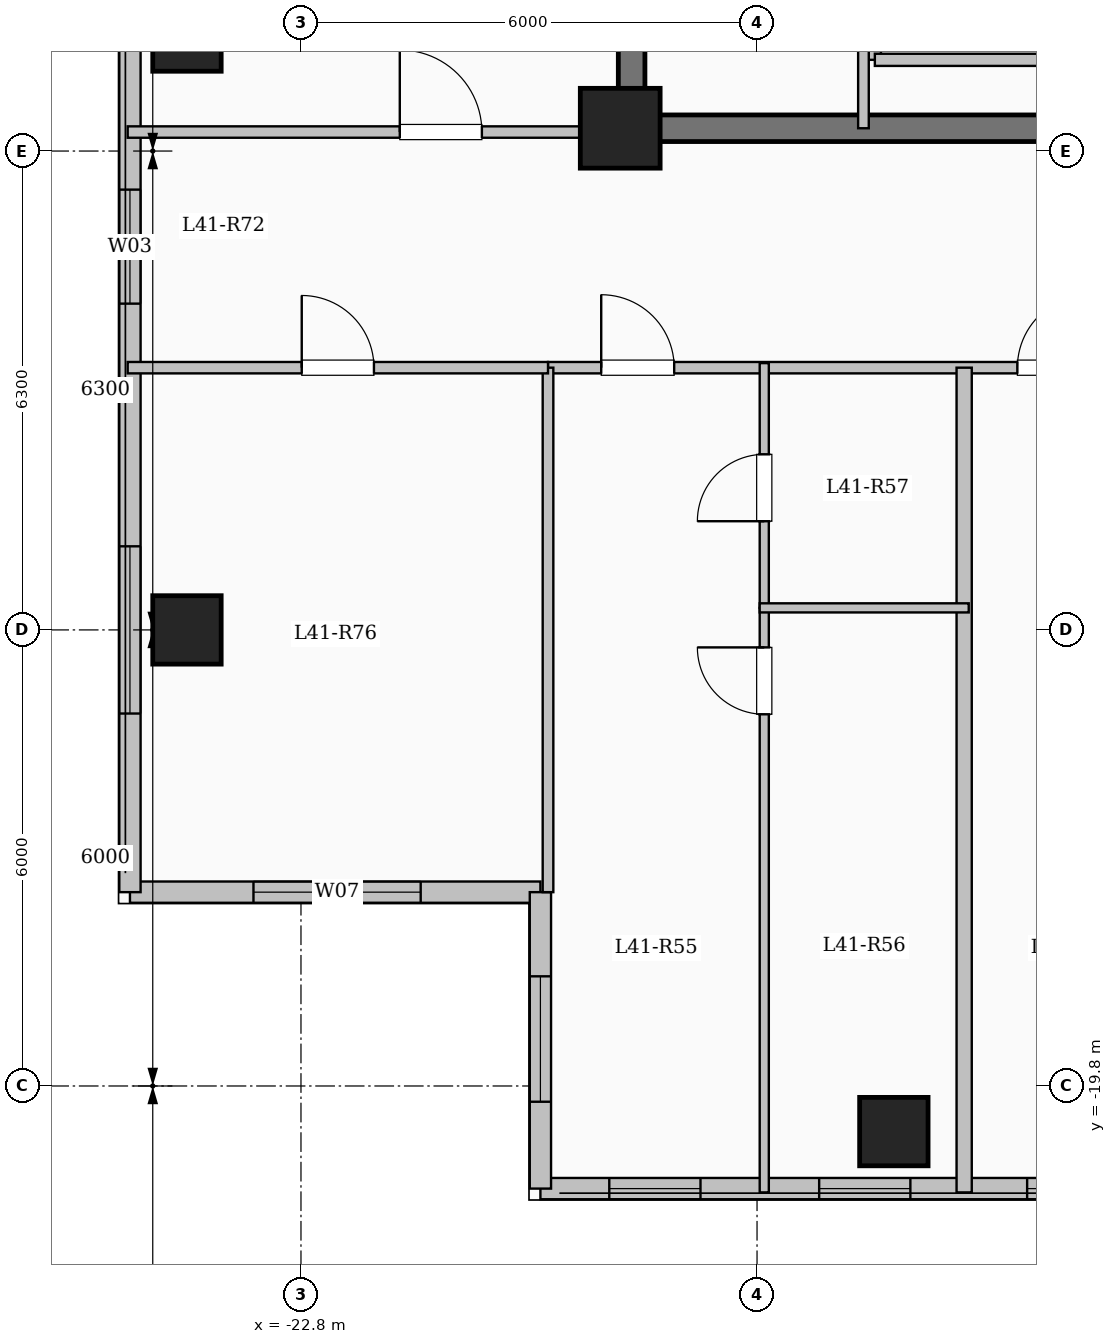
"""IFC4 building model, lengths in metres.
Left out: names, types, materials, properties, quantities, classifications, styles, units other than length and angle.
Written with IfcOpenShell. Run it as: python <this file> out.ifc"""

import sys

from ifc_helpers import new_model, si_unit, direction, frame, frame_2d, origin, origin_2d, place, context, subcontext, project, spatial, rectangle, extrude, element, fill, save


model = new_model("IFC4")
c1 = context("Model", 3, precision=1e-05, world=origin(), true_north=direction((0.0, 1.0)))
c2 = subcontext(c1, "Body", "Model", "MODEL_VIEW")
j1 = project(units=[si_unit("LENGTHUNIT", "METRE"), si_unit("PLANEANGLEUNIT", "RADIAN")], contexts=[c1])
p1 = place(None, origin())
s1 = spatial("IfcSite", under=j1, at=p1, CompositionType="ELEMENT")
p2 = place(p1, origin())
s2 = spatial("IfcBuilding", under=s1, at=p2, CompositionType="ELEMENT")
p3 = place(p2, frame((0.0, 0.0, 152.7)))
s3 = spatial("IfcBuildingStorey", under=s2, at=p3, CompositionType="ELEMENT", Elevation=152.7)
p4 = place(p3, frame((-18.6, -7.2, 0.0), z_axis=(0.0, 0.0, 1.0), x_axis=(1.0, 0.0, 0.0)))
e1 = element("IfcColumn", 1, at=p4, inside=s3, PredefinedType="COLUMN", context=c2, shape_type="SweptSolid", body=[
    extrude(rectangle(XDim=1.05, YDim=1.05, at=origin_2d()), origin(), (0.0, 0.0, 1.0), 3.35),
])
for number, where, z_axis, x_axis in (
    (2, (-15.0, -20.4, 0.0), (0.0, 0.0, 1.0), (1.0, 0.0, 0.0)),
    (3, (-24.3, -13.8, 0.0), (0.0, 0.0, 1.0), (1.0, 0.0, 0.0)),
    (4, (-24.3, -6.0, 0.0), (0.0, 0.0, 1.0), (1.0, 0.0, 0.0)),
):
    element("IfcColumn", number, at=place(p3, frame(where, z_axis=z_axis, x_axis=x_axis)), inside=s3, PredefinedType="COLUMN", context=c2, shape_type="SweptSolid", body=[
        extrude(rectangle(XDim=0.9, YDim=0.9, at=origin_2d()), origin(), (0.0, 0.0, 1.0), 3.35),
    ])
p5 = place(p3, frame((-19.65, -17.25, 0.0), z_axis=(0.0, 0.0, 1.0), x_axis=(-1.0, 0.0, 0.0)))
e5 = element("IfcWall", 5, at=p5, inside=s3, PredefinedType="SOLIDWALL", context=c2, shape_type="SweptSolid", body=[
    extrude(rectangle(XDim=5.4, YDim=0.28, at=frame_2d((2.7, 0.0))), origin(), (0.0, 0.0, 1.0), 3.1),
])
p6 = place(p5, frame((1.575, 0.0, 0.9)))
e6 = element("IfcOpeningElement", 6, at=p6, cuts=e5, PredefinedType="OPENING", context=c2, shape_type="SweptSolid", body=[
    extrude(rectangle(XDim=2.2, YDim=1.75, at=frame_2d((1.1, 0.875))), frame((0.0, 0.15, 0.0), z_axis=(0.0, -1.0, 0.0), x_axis=(1.0, 0.0, 0.0)), (0.0, 0.0, 1.0), 0.3),
])
p7 = place(p3, frame((-25.05, -17.25, 0.0), z_axis=(0.0, 0.0, 1.0), x_axis=(0.0, 1.0, 0.0)))
e7 = element("IfcWall", 7, at=p7, inside=s3, PredefinedType="SOLIDWALL", context=c2, shape_type="SweptSolid", body=[
    extrude(rectangle(XDim=34.5, YDim=0.28, at=frame_2d((17.25, 0.0))), origin(), (0.0, 0.0, 1.0), 3.1),
])
p8 = place(p7, frame((2.35, 0.0, 0.9)))
e8 = element("IfcOpeningElement", 8, at=p8, cuts=e7, PredefinedType="OPENING", context=c2, shape_type="SweptSolid", body=[
    extrude(rectangle(XDim=2.2, YDim=1.75, at=frame_2d((1.1, 0.875))), frame((0.0, 0.15, 0.0), z_axis=(0.0, -1.0, 0.0), x_axis=(1.0, 0.0, 0.0)), (0.0, 0.0, 1.0), 0.3),
])
p9 = place(p7, frame((7.742, 0.0, 0.9)))
e9 = element("IfcOpeningElement", 9, at=p9, cuts=e7, PredefinedType="OPENING", context=c2, shape_type="SweptSolid", body=[
    extrude(rectangle(XDim=1.5, YDim=1.65, at=frame_2d((0.75, 0.825))), frame((0.0, 0.15, 0.0), z_axis=(0.0, -1.0, 0.0), x_axis=(1.0, 0.0, 0.0)), (0.0, 0.0, 1.0), 0.3),
])
p10 = place(p7, frame((18.0, 0.0, 0.9)))
e10 = element("IfcOpeningElement", 10, at=p10, cuts=e7, PredefinedType="OPENING", context=c2, shape_type="SweptSolid", body=[
    extrude(rectangle(XDim=2.0, YDim=1.7, at=frame_2d((1.0, 0.85))), frame((0.0, 0.15, 0.0), z_axis=(0.0, -1.0, 0.0), x_axis=(1.0, 0.0, 0.0)), (0.0, 0.0, 1.0), 0.3),
])
p11 = place(p7, frame((28.375, 0.0, 0.95)))
e11 = element("IfcOpeningElement", 11, at=p11, cuts=e7, PredefinedType="OPENING", context=c2, shape_type="SweptSolid", body=[
    extrude(rectangle(XDim=1.0, YDim=1.5, at=frame_2d((0.5, 0.75))), frame((0.0, 0.15, 0.0), z_axis=(0.0, -1.0, 0.0), x_axis=(1.0, 0.0, 0.0)), (0.0, 0.0, 1.0), 0.3),
])
p12 = place(p7, frame((31.125, 0.0, 0.9)))
e12 = element("IfcOpeningElement", 12, at=p12, cuts=e7, PredefinedType="OPENING", context=c2, shape_type="SweptSolid", body=[
    extrude(rectangle(XDim=2.0, YDim=1.7, at=frame_2d((1.0, 0.85))), frame((0.0, 0.15, 0.0), z_axis=(0.0, -1.0, 0.0), x_axis=(1.0, 0.0, 0.0)), (0.0, 0.0, 1.0), 0.3),
])
p13 = place(p3, frame((-7.35, -21.15, 0.0), z_axis=(0.0, 0.0, 1.0), x_axis=(-1.0, 0.0, 0.0)))
e13 = element("IfcWall", 13, at=p13, inside=s3, PredefinedType="SOLIDWALL", context=c2, shape_type="SweptSolid", body=[
    extrude(rectangle(XDim=12.3, YDim=0.28, at=frame_2d((6.15, 0.0))), origin(), (0.0, 0.0, 1.0), 3.1),
])
p14 = place(p13, frame((0.147, 0.0, 0.95)))
e14 = element("IfcOpeningElement", 14, at=p14, cuts=e13, PredefinedType="OPENING", context=c2, shape_type="SweptSolid", body=[
    extrude(rectangle(XDim=0.85, YDim=1.5, at=frame_2d((0.425, 0.75))), frame((0.0, 0.15, 0.0), z_axis=(0.0, -1.0, 0.0), x_axis=(1.0, 0.0, 0.0)), (0.0, 0.0, 1.0), 0.3),
])
p15 = place(p13, frame((1.96, 0.0, 0.95)))
e15 = element("IfcOpeningElement", 15, at=p15, cuts=e13, PredefinedType="OPENING", context=c2, shape_type="SweptSolid", body=[
    extrude(rectangle(XDim=1.2, YDim=1.5, at=frame_2d((0.6, 0.75))), frame((0.0, 0.15, 0.0), z_axis=(0.0, -1.0, 0.0), x_axis=(1.0, 0.0, 0.0)), (0.0, 0.0, 1.0), 0.3),
])
p16 = place(p13, frame((4.697, 0.0, 0.95)))
e16 = element("IfcOpeningElement", 16, at=p16, cuts=e13, PredefinedType="OPENING", context=c2, shape_type="SweptSolid", body=[
    extrude(rectangle(XDim=1.2, YDim=1.5, at=frame_2d((0.6, 0.75))), frame((0.0, 0.15, 0.0), z_axis=(0.0, -1.0, 0.0), x_axis=(1.0, 0.0, 0.0)), (0.0, 0.0, 1.0), 0.3),
])
p17 = place(p13, frame((7.433, 0.0, 0.95)))
e17 = element("IfcOpeningElement", 17, at=p17, cuts=e13, PredefinedType="OPENING", context=c2, shape_type="SweptSolid", body=[
    extrude(rectangle(XDim=1.2, YDim=1.5, at=frame_2d((0.6, 0.75))), frame((0.0, 0.15, 0.0), z_axis=(0.0, -1.0, 0.0), x_axis=(1.0, 0.0, 0.0)), (0.0, 0.0, 1.0), 0.3),
])
p18 = place(p13, frame((10.194, 0.0, 0.95)))
e18 = element("IfcOpeningElement", 18, at=p18, cuts=e13, PredefinedType="OPENING", context=c2, shape_type="SweptSolid", body=[
    extrude(rectangle(XDim=1.2, YDim=1.5, at=frame_2d((0.6, 0.75))), frame((0.0, 0.15, 0.0), z_axis=(0.0, -1.0, 0.0), x_axis=(1.0, 0.0, 0.0)), (0.0, 0.0, 1.0), 0.3),
])
p19 = place(p3, frame((-19.65, -21.15, 0.0), z_axis=(0.0, 0.0, 1.0), x_axis=(0.0, 1.0, 0.0)))
e19 = element("IfcWall", 19, at=p19, inside=s3, PredefinedType="SOLIDWALL", context=c2, shape_type="SweptSolid", body=[
    extrude(rectangle(XDim=3.9, YDim=0.28, at=frame_2d((1.95, 0.0))), origin(), (0.0, 0.0, 1.0), 3.1),
])
p20 = place(p19, frame((1.143, 0.0, 0.9)))
e20 = element("IfcOpeningElement", 20, at=p20, cuts=e19, PredefinedType="OPENING", context=c2, shape_type="SweptSolid", body=[
    extrude(rectangle(XDim=1.65, YDim=1.6, at=frame_2d((0.825, 0.8))), frame((0.0, 0.15, 0.0), z_axis=(0.0, -1.0, 0.0), x_axis=(1.0, 0.0, 0.0)), (0.0, 0.0, 1.0), 0.3),
])
p21 = place(p3, frame((-15.25, -6.3, 0.0), z_axis=(0.0, 0.0, 1.0), x_axis=(0.0, 1.0, 0.0)))
e21 = element("IfcWall", 21, at=p21, inside=s3, PredefinedType="SOLIDWALL", context=c2, shape_type="SweptSolid", body=[
    extrude(rectangle(XDim=2.6, YDim=0.16, at=frame_2d((1.3, 0.0))), origin(), (0.0, 0.0, 1.0), 3.1),
])
p22 = place(p3, frame((-15.25, -6.3, 0.0), z_axis=(0.0, 0.0, 1.0), x_axis=(1.0, 0.0, 0.0)))
e22 = element("IfcWall", 22, at=p22, inside=s3, PredefinedType="SOLIDWALL", context=c2, shape_type="SweptSolid", body=[
    extrude(rectangle(XDim=2.3, YDim=0.16, at=frame_2d((1.15, 0.0))), origin(), (0.0, 0.0, 1.0), 3.1),
])
p23 = place(p3, frame((-18.45, -7.375, 0.0), z_axis=(0.0, 0.0, 1.0), x_axis=(0.0, 1.0, 0.0)))
e23 = element("IfcWall", 23, at=p23, inside=s3, PredefinedType="SHEAR", context=c2, shape_type="SweptSolid", body=[
    extrude(rectangle(XDim=14.05, YDim=0.35, at=frame_2d((7.025, 0.0))), origin(), (0.0, 0.0, 1.0), 3.35),
])
p24 = place(p3, frame((-18.625, -7.2, 0.0), z_axis=(0.0, 0.0, 1.0), x_axis=(1.0, 0.0, 0.0)))
e24 = element("IfcWall", 24, at=p24, inside=s3, PredefinedType="SHEAR", context=c2, shape_type="SweptSolid", body=[
    extrude(rectangle(XDim=8.55, YDim=0.35, at=frame_2d((4.275, 0.0))), origin(), (0.0, 0.0, 1.0), 3.35),
])
p25 = place(p3, frame((-15.4, -7.2, 0.0), z_axis=(0.0, 0.0, 1.0), x_axis=(0.0, 1.0, 0.0)))
e25 = element("IfcWall", 25, at=p25, inside=s3, PredefinedType="PARTITIONING", context=c2, shape_type="SweptSolid", body=[
    extrude(rectangle(XDim=10.45, YDim=0.14, at=frame_2d((5.225, 0.0))), origin(), (0.0, 0.0, 1.0), 3.1),
])
p26 = place(p25, frame((9.25, 0.0, 0.0)))
e26 = element("IfcOpeningElement", 26, at=p26, cuts=e25, PredefinedType="OPENING", context=c2, shape_type="SweptSolid", body=[
    extrude(rectangle(XDim=0.9, YDim=2.08, at=frame_2d((0.45, 1.04))), frame((0.0, 0.08, 0.0), z_axis=(0.0, -1.0, 0.0), x_axis=(1.0, 0.0, 0.0)), (0.0, 0.0, 1.0), 0.16),
])
p27 = place(p3, frame((-19.55, -10.35, 0.0), z_axis=(0.0, 0.0, 1.0), x_axis=(1.0, 0.0, 0.0)))
e27 = element("IfcWall", 27, at=p27, inside=s3, PredefinedType="PARTITIONING", context=c2, shape_type="SweptSolid", body=[
    extrude(rectangle(XDim=11.0, YDim=0.15, at=frame_2d((5.5, 0.0))), origin(), (0.0, 0.0, 1.0), 3.1),
])
p28 = place(p27, frame((0.7, 0.0, 0.0)))
e28 = element("IfcOpeningElement", 28, at=p28, cuts=e27, PredefinedType="OPENING", context=c2, shape_type="SweptSolid", body=[
    extrude(rectangle(XDim=0.96, YDim=2.15, at=frame_2d((0.48, 1.075))), frame((0.0, 0.085, 0.0), z_axis=(0.0, -1.0, 0.0), x_axis=(1.0, 0.0, 0.0)), (0.0, 0.0, 1.0), 0.17),
])
p29 = place(p27, frame((6.175, 0.0, 0.0)))
e29 = element("IfcOpeningElement", 29, at=p29, cuts=e27, PredefinedType="OPENING", context=c2, shape_type="SweptSolid", body=[
    extrude(rectangle(XDim=0.96, YDim=2.15, at=frame_2d((0.48, 1.075))), frame((0.0, 0.085, 0.0), z_axis=(0.0, -1.0, 0.0), x_axis=(1.0, 0.0, 0.0)), (0.0, 0.0, 1.0), 0.17),
])
p30 = place(p3, frame((-14.075, -21.2, 0.0), z_axis=(0.0, 0.0, 1.0), x_axis=(0.0, 1.0, 0.0)))
e30 = element("IfcWall", 30, at=p30, inside=s3, PredefinedType="SOLIDWALL", context=c2, shape_type="SweptSolid", body=[
    extrude(rectangle(XDim=10.85, YDim=0.2, at=frame_2d((5.425, 0.0))), origin(), (0.0, 0.0, 1.0), 3.1),
])
p31 = place(p3, frame((-16.705, -21.2, 0.0), z_axis=(0.0, 0.0, 1.0), x_axis=(0.0, 1.0, 0.0)))
e31 = element("IfcWall", 31, at=p31, inside=s3, PredefinedType="PARTITIONING", context=c2, shape_type="SweptSolid", body=[
    extrude(rectangle(XDim=7.69, YDim=0.12, at=frame_2d((3.845, 0.0))), origin(), (0.0, 0.0, 1.0), 3.1),
])
p32 = place(p31, frame((6.29, 0.0, 0.0)))
e32 = element("IfcOpeningElement", 32, at=p32, cuts=e31, PredefinedType="OPENING", context=c2, shape_type="SweptSolid", body=[
    extrude(rectangle(XDim=0.88, YDim=2.1, at=frame_2d((0.44, 1.05))), frame((0.0, 0.07, 0.0), z_axis=(0.0, -1.0, 0.0), x_axis=(1.0, 0.0, 0.0)), (0.0, 0.0, 1.0), 0.14),
])
p33 = place(p3, frame((-16.705, -13.51, 0.0), z_axis=(0.0, 0.0, 1.0), x_axis=(0.0, 1.0, 0.0)))
e33 = element("IfcWall", 33, at=p33, inside=s3, PredefinedType="PARTITIONING", context=c2, shape_type="SweptSolid", body=[
    extrude(rectangle(XDim=3.22, YDim=0.12, at=frame_2d((1.61, 0.0))), origin(), (0.0, 0.0, 1.0), 3.1),
])
p34 = place(p33, frame((1.14, 0.0, 0.0)))
e34 = element("IfcOpeningElement", 34, at=p34, cuts=e33, PredefinedType="OPENING", context=c2, shape_type="SweptSolid", body=[
    extrude(rectangle(XDim=0.88, YDim=2.1, at=frame_2d((0.44, 1.05))), frame((0.0, 0.07, 0.0), z_axis=(0.0, -1.0, 0.0), x_axis=(1.0, 0.0, 0.0)), (0.0, 0.0, 1.0), 0.14),
])
p35 = place(p3, frame((-16.765, -13.51, 0.0), z_axis=(0.0, 0.0, 1.0), x_axis=(1.0, 0.0, 0.0)))
e35 = element("IfcWall", 35, at=p35, inside=s3, PredefinedType="PARTITIONING", context=c2, shape_type="SweptSolid", body=[
    extrude(rectangle(XDim=2.75, YDim=0.12, at=frame_2d((1.375, 0.0))), origin(), (0.0, 0.0, 1.0), 3.1),
])
p36 = place(p3, frame((-25.08, -7.25, 0.0), z_axis=(0.0, 0.0, 1.0), x_axis=(1.0, 0.0, 0.0)))
e36 = element("IfcWall", 36, at=p36, inside=s3, PredefinedType="PARTITIONING", context=c2, shape_type="SweptSolid", body=[
    extrude(rectangle(XDim=6.63, YDim=0.15, at=frame_2d((3.315, 0.0))), origin(), (0.0, 0.0, 1.0), 3.1),
])
p37 = place(p36, frame((3.58, 0.0, 0.0)))
e37 = element("IfcOpeningElement", 37, at=p37, cuts=e36, PredefinedType="OPENING", context=c2, shape_type="SweptSolid", body=[
    extrude(rectangle(XDim=1.08, YDim=2.15, at=frame_2d((0.54, 1.075))), frame((0.0, 0.085, 0.0), z_axis=(0.0, -1.0, 0.0), x_axis=(1.0, 0.0, 0.0)), (0.0, 0.0, 1.0), 0.17),
])
p38 = place(p3, frame((-19.55, -17.25, 0.0), z_axis=(0.0, 0.0, 1.0), x_axis=(0.0, 1.0, 0.0)))
e38 = element("IfcWall", 38, at=p38, inside=s3, PredefinedType="PARTITIONING", context=c2, shape_type="SweptSolid", body=[
    extrude(rectangle(XDim=6.9, YDim=0.14, at=frame_2d((3.45, 0.0))), origin(), (0.0, 0.0, 1.0), 3.1),
])
p39 = place(p3, frame((-25.08, -10.35, 0.0), z_axis=(0.0, 0.0, 1.0), x_axis=(1.0, 0.0, 0.0)))
e39 = element("IfcWall", 39, at=p39, inside=s3, PredefinedType="PARTITIONING", context=c2, shape_type="SweptSolid", body=[
    extrude(rectangle(XDim=5.53, YDim=0.15, at=frame_2d((2.765, 0.0))), origin(), (0.0, 0.0, 1.0), 3.1),
])
p40 = place(p39, frame((2.29, 0.0, 0.0)))
e40 = element("IfcOpeningElement", 40, at=p40, cuts=e39, PredefinedType="OPENING", context=c2, shape_type="SweptSolid", body=[
    extrude(rectangle(XDim=0.95, YDim=2.15, at=frame_2d((0.475, 1.075))), frame((0.0, 0.085, 0.0), z_axis=(0.0, -1.0, 0.0), x_axis=(1.0, 0.0, 0.0)), (0.0, 0.0, 1.0), 0.17),
])
p41 = place(p6, origin())
e41 = element("IfcWindow", 41, at=p41, inside=s3, PartitioningType="SINGLE_PANEL", PredefinedType="WINDOW", context=c2, shape_type="SweptSolid", body=[
    extrude(rectangle(XDim=2.2, YDim=1.75, at=frame_2d((1.1, 0.875))), frame((0.0, 0.03, 0.0), z_axis=(0.0, -1.0, 0.0), x_axis=(1.0, 0.0, 0.0)), (0.0, 0.0, 1.0), 0.06),
])
fill(e6, e41)
p42 = place(p8, origin())
e42 = element("IfcWindow", 42, at=p42, inside=s3, PartitioningType="SINGLE_PANEL", PredefinedType="WINDOW", context=c2, shape_type="SweptSolid", body=[
    extrude(rectangle(XDim=2.2, YDim=1.75, at=frame_2d((1.1, 0.875))), frame((0.0, 0.03, 0.0), z_axis=(0.0, -1.0, 0.0), x_axis=(1.0, 0.0, 0.0)), (0.0, 0.0, 1.0), 0.06),
])
fill(e8, e42)
p43 = place(p9, origin())
e43 = element("IfcWindow", 43, at=p43, inside=s3, PartitioningType="SINGLE_PANEL", PredefinedType="WINDOW", context=c2, shape_type="SweptSolid", body=[
    extrude(rectangle(XDim=1.5, YDim=1.65, at=frame_2d((0.75, 0.825))), frame((0.0, 0.03, 0.0), z_axis=(0.0, -1.0, 0.0), x_axis=(1.0, 0.0, 0.0)), (0.0, 0.0, 1.0), 0.06),
])
fill(e9, e43)
p44 = place(p16, origin())
e44 = element("IfcWindow", 44, at=p44, inside=s3, PartitioningType="SINGLE_PANEL", PredefinedType="WINDOW", context=c2, shape_type="SweptSolid", body=[
    extrude(rectangle(XDim=1.2, YDim=1.5, at=frame_2d((0.6, 0.75))), frame((0.0, 0.03, 0.0), z_axis=(0.0, -1.0, 0.0), x_axis=(1.0, 0.0, 0.0)), (0.0, 0.0, 1.0), 0.06),
])
fill(e16, e44)
p45 = place(p17, origin())
e45 = element("IfcWindow", 45, at=p45, inside=s3, PartitioningType="SINGLE_PANEL", PredefinedType="WINDOW", context=c2, shape_type="SweptSolid", body=[
    extrude(rectangle(XDim=1.2, YDim=1.5, at=frame_2d((0.6, 0.75))), frame((0.0, 0.03, 0.0), z_axis=(0.0, -1.0, 0.0), x_axis=(1.0, 0.0, 0.0)), (0.0, 0.0, 1.0), 0.06),
])
fill(e17, e45)
p46 = place(p18, origin())
e46 = element("IfcWindow", 46, at=p46, inside=s3, PartitioningType="SINGLE_PANEL", PredefinedType="WINDOW", context=c2, shape_type="SweptSolid", body=[
    extrude(rectangle(XDim=1.2, YDim=1.5, at=frame_2d((0.6, 0.75))), frame((0.0, 0.03, 0.0), z_axis=(0.0, -1.0, 0.0), x_axis=(1.0, 0.0, 0.0)), (0.0, 0.0, 1.0), 0.06),
])
fill(e18, e46)
p47 = place(p20, origin())
e47 = element("IfcWindow", 47, at=p47, inside=s3, PartitioningType="SINGLE_PANEL", PredefinedType="WINDOW", context=c2, shape_type="SweptSolid", body=[
    extrude(rectangle(XDim=1.65, YDim=1.6, at=frame_2d((0.825, 0.8))), frame((0.0, 0.03, 0.0), z_axis=(0.0, -1.0, 0.0), x_axis=(1.0, 0.0, 0.0)), (0.0, 0.0, 1.0), 0.06),
])
fill(e20, e47)
p48 = place(p28, origin())
e48 = element("IfcDoor", 48, at=p48, inside=s3, OperationType="SINGLE_SWING_LEFT", PredefinedType="DOOR", context=c2, shape_type="SweptSolid", body=[
    extrude(rectangle(XDim=0.96, YDim=2.15, at=frame_2d((0.48, 1.075))), frame((0.0, 0.025, 0.0), z_axis=(0.0, -1.0, 0.0), x_axis=(1.0, 0.0, 0.0)), (0.0, 0.0, 1.0), 0.05),
])
fill(e28, e48)
p49 = place(p32, origin())
e49 = element("IfcDoor", 49, at=p49, inside=s3, OperationType="SINGLE_SWING_RIGHT", PredefinedType="DOOR", context=c2, shape_type="SweptSolid", body=[
    extrude(rectangle(XDim=0.88, YDim=2.1, at=frame_2d((0.44, 1.05))), frame((0.0, 0.025, 0.0), z_axis=(0.0, -1.0, 0.0), x_axis=(1.0, 0.0, 0.0)), (0.0, 0.0, 1.0), 0.05),
])
fill(e32, e49)
p50 = place(p34, origin())
e50 = element("IfcDoor", 50, at=p50, inside=s3, OperationType="SINGLE_SWING_LEFT", PredefinedType="DOOR", context=c2, shape_type="SweptSolid", body=[
    extrude(rectangle(XDim=0.88, YDim=2.1, at=frame_2d((0.44, 1.05))), frame((0.0, 0.025, 0.0), z_axis=(0.0, -1.0, 0.0), x_axis=(1.0, 0.0, 0.0)), (0.0, 0.0, 1.0), 0.05),
])
fill(e34, e50)
p51 = place(p29, origin())
e51 = element("IfcDoor", 51, at=p51, inside=s3, OperationType="SINGLE_SWING_RIGHT", PredefinedType="DOOR", context=c2, shape_type="SweptSolid", body=[
    extrude(rectangle(XDim=0.96, YDim=2.15, at=frame_2d((0.48, 1.075))), frame((0.0, 0.025, 0.0), z_axis=(0.0, -1.0, 0.0), x_axis=(1.0, 0.0, 0.0)), (0.0, 0.0, 1.0), 0.05),
])
fill(e29, e51)
p52 = place(p40, origin())
e52 = element("IfcDoor", 52, at=p52, inside=s3, OperationType="SINGLE_SWING_LEFT", PredefinedType="DOOR", context=c2, shape_type="SweptSolid", body=[
    extrude(rectangle(XDim=0.95, YDim=2.15, at=frame_2d((0.475, 1.075))), frame((0.0, 0.025, 0.0), z_axis=(0.0, -1.0, 0.0), x_axis=(1.0, 0.0, 0.0)), (0.0, 0.0, 1.0), 0.05),
])
fill(e40, e52)
p53 = place(p37, origin())
e53 = element("IfcDoor", 53, at=p53, inside=s3, OperationType="SINGLE_SWING_LEFT", PredefinedType="DOOR", context=c2, shape_type="SweptSolid", body=[
    extrude(rectangle(XDim=1.08, YDim=2.15, at=frame_2d((0.54, 1.075))), frame((0.0, 0.025, 0.0), z_axis=(0.0, -1.0, 0.0), x_axis=(1.0, 0.0, 0.0)), (0.0, 0.0, 1.0), 0.05),
])
fill(e37, e53)
save(model, sys.argv[1])
